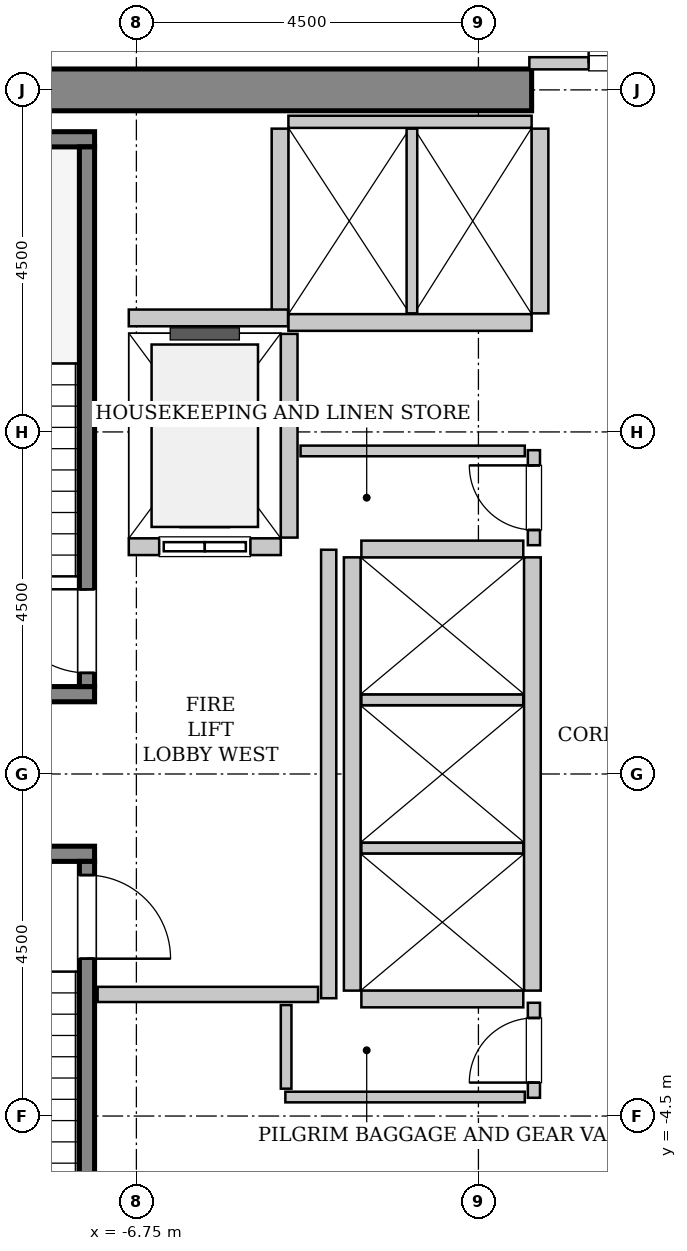
"""IFC4 building model, lengths in metres.
Left out: names, types, materials, properties, quantities, classifications, styles, units other than length and angle.
Written with IfcOpenShell. Run it as: python <this file> out.ifc"""

import sys

from ifc_helpers import new_model, si_unit, direction, frame, frame_2d, origin, place, context, subcontext, project, spatial, rectangle, extrude, source, transform, mapped, element, fill, save


model = new_model("IFC4")
c1 = context("Model", 3, precision=1e-05, world=origin(), true_north=direction((0.0, 1.0)))
c2 = subcontext(c1, "Body", "Model", "MODEL_VIEW")
j1 = project(units=[si_unit("LENGTHUNIT", "METRE"), si_unit("PLANEANGLEUNIT", "RADIAN")], contexts=[c1])
p1 = place(None, origin())
s1 = spatial("IfcSite", under=j1, at=p1, CompositionType="ELEMENT")
p2 = place(p1, origin())
s2 = spatial("IfcBuilding", under=s1, at=p2, CompositionType="ELEMENT")
p3 = place(p2, frame((0.0, 0.0, 148.8)))
s3 = spatial("IfcBuildingStorey", under=s2, at=p3, CompositionType="ELEMENT", Elevation=148.8)
m1 = source(origin(), c2, "Body", "SweptSolid", [
    extrude(rectangle(XDim=9.975, YDim=0.55, at=frame_2d((4.987, 0.0))), origin(), (0.0, 0.0, 1.0), 3.8),
])
p4 = place(p3, frame((-11.525, 9.0, 0.0), z_axis=(0.0, 0.0, 1.0), x_axis=(1.0, 0.0, 0.0)))
e1 = element("IfcWall", 1, at=p4, inside=s3, PredefinedType="SHEAR", context=c2, shape_type="MappedRepresentation", body=[
    mapped(m1, transform((0.0, 0.0, 0.0), x_axis=(1.0, 0.0, 0.0), y_axis=(0.0, 1.0, 0.0), z_axis=(0.0, 0.0, 1.0), scale=1.0)),
])
m2 = source(origin(), c2, "Body", "SweptSolid", [
    extrude(rectangle(XDim=3.4, YDim=0.2, at=frame_2d((1.7, 0.0))), origin(), (0.0, 0.0, 1.0), 3.8),
])
p5 = place(p3, frame((-7.3, 1.05, 0.0), z_axis=(0.0, 0.0, 1.0), x_axis=(-1.0, 0.0, 0.0)))
e2 = element("IfcWall", 2, at=p5, inside=s3, PredefinedType="SOLIDWALL", context=c2, shape_type="MappedRepresentation", body=[
    mapped(m2, transform((0.0, 0.0, 0.0), x_axis=(1.0, 0.0, 0.0), y_axis=(0.0, 1.0, 0.0), z_axis=(0.0, 0.0, 1.0), scale=1.0)),
])
m3 = source(origin(), c2, "Body", "SweptSolid", [
    extrude(rectangle(XDim=3.68, YDim=0.2, at=frame_2d((1.84, 0.0))), origin(), (0.0, 0.0, 1.0), 3.8),
])
p6 = place(p3, frame((-7.3, 8.35, 0.0), z_axis=(0.0, 0.0, 1.0), x_axis=(-1.0, 0.0, 0.0)))
e3 = element("IfcWall", 3, at=p6, inside=s3, PredefinedType="SOLIDWALL", context=c2, shape_type="MappedRepresentation", body=[
    mapped(m3, transform((0.0, 0.0, 0.0), x_axis=(1.0, 0.0, 0.0), y_axis=(0.0, 1.0, 0.0), z_axis=(0.0, 0.0, 1.0), scale=1.0)),
])
m4 = source(origin(), c2, "Body", "SweptSolid", [
    extrude(rectangle(XDim=7.1, YDim=0.2, at=frame_2d((3.55, 0.0))), origin(), (0.0, 0.0, 1.0), 3.8),
])
p7 = place(p3, frame((-7.4, 1.15, 0.0), z_axis=(0.0, 0.0, 1.0), x_axis=(0.0, 1.0, 0.0)))
e4 = element("IfcWall", 4, at=p7, inside=s3, PredefinedType="SOLIDWALL", context=c2, shape_type="MappedRepresentation", body=[
    mapped(m4, transform((0.0, 0.0, 0.0), x_axis=(1.0, 0.0, 0.0), y_axis=(0.0, 1.0, 0.0), z_axis=(0.0, 0.0, 1.0), scale=1.0)),
])
p8 = place(p7, frame((0.18, 0.0, 0.0)))
e5 = element("IfcOpeningElement", 5, at=p8, cuts=e4, PredefinedType="OPENING", context=c2, shape_type="SweptSolid", body=[
    extrude(rectangle(XDim=1.1, YDim=2.15, at=frame_2d((0.55, 1.075))), frame((0.0, 0.11, 0.0), z_axis=(0.0, -1.0, 0.0), x_axis=(1.0, 0.0, 0.0)), (0.0, 0.0, 1.0), 0.22),
])
p9 = place(p3, frame((-10.7, -1.05, 0.0), z_axis=(0.0, 0.0, 1.0), x_axis=(1.0, 0.0, 0.0)))
e6 = element("IfcWall", 6, at=p9, inside=s3, PredefinedType="SOLIDWALL", context=c2, shape_type="MappedRepresentation", body=[
    mapped(m2, transform((0.0, 0.0, 0.0), x_axis=(1.0, 0.0, 0.0), y_axis=(0.0, 1.0, 0.0), z_axis=(0.0, 0.0, 1.0), scale=1.0)),
])
p10 = place(p3, frame((-7.4, -1.15, 0.0), z_axis=(0.0, 0.0, 1.0), x_axis=(0.0, -1.0, 0.0)))
e7 = element("IfcWall", 7, at=p10, inside=s3, PredefinedType="SOLIDWALL", context=c2, shape_type="MappedRepresentation", body=[
    mapped(m4, transform((0.0, 0.0, 0.0), x_axis=(1.0, 0.0, 0.0), y_axis=(0.0, 1.0, 0.0), z_axis=(0.0, 0.0, 1.0), scale=1.0)),
])
p11 = place(p10, frame((0.18, 0.0, 0.0)))
e8 = element("IfcOpeningElement", 8, at=p11, cuts=e7, PredefinedType="OPENING", context=c2, shape_type="SweptSolid", body=[
    extrude(rectangle(XDim=1.1, YDim=2.15, at=frame_2d((0.55, 1.075))), frame((0.0, 0.11, 0.0), z_axis=(0.0, -1.0, 0.0), x_axis=(1.0, 0.0, 0.0)), (0.0, 0.0, 1.0), 0.22),
])
m5 = source(origin(), c2, "Body", "SweptSolid", [
    extrude(rectangle(XDim=2.0, YDim=0.22, at=frame_2d((1.0, 0.0))), origin(), (0.0, 0.0, 1.0), 3.535),
])
p12 = place(p3, frame((-6.85, 2.99, 0.0), z_axis=(0.0, 0.0, 1.0), x_axis=(1.0, 0.0, 0.0)))
e9 = element("IfcWall", 9, at=p12, inside=s3, PredefinedType="SOLIDWALL", context=c2, shape_type="MappedRepresentation", body=[
    mapped(m5, transform((0.0, 0.0, 0.0), x_axis=(1.0, 0.0, 0.0), y_axis=(0.0, 1.0, 0.0), z_axis=(0.0, 0.0, 1.0), scale=1.0)),
])
p13 = place(p12, frame((0.4, 0.0, 0.0)))
e10 = element("IfcOpeningElement", 10, at=p13, cuts=e9, PredefinedType="OPENING", context=c2, shape_type="SweptSolid", body=[
    extrude(rectangle(XDim=1.2, YDim=2.2, at=frame_2d((0.6, 1.1))), frame((0.0, 0.12, 0.0), z_axis=(0.0, -1.0, 0.0), x_axis=(1.0, 0.0, 0.0)), (0.0, 0.0, 1.0), 0.24),
])
m6 = source(origin(), c2, "Body", "SweptSolid", [
    extrude(rectangle(XDim=2.68, YDim=0.22, at=frame_2d((1.34, 0.0))), origin(), (0.0, 0.0, 1.0), 3.535),
])
p14 = place(p3, frame((-4.74, 3.11, 0.0), z_axis=(0.0, 0.0, 1.0), x_axis=(0.0, 1.0, 0.0)))
e11 = element("IfcWall", 11, at=p14, inside=s3, PredefinedType="SOLIDWALL", context=c2, shape_type="MappedRepresentation", body=[
    mapped(m6, transform((0.0, 0.0, 0.0), x_axis=(1.0, 0.0, 0.0), y_axis=(0.0, 1.0, 0.0), z_axis=(0.0, 0.0, 1.0), scale=1.0)),
])
m7 = source(origin(), c2, "Body", "SweptSolid", [
    extrude(rectangle(XDim=3.2, YDim=0.22, at=frame_2d((1.6, 0.0))), origin(), (0.0, 0.0, 1.0), 3.535),
])
p15 = place(p3, frame((-4.75, 5.94, 0.0), z_axis=(0.0, 0.0, 1.0), x_axis=(1.0, 0.0, 0.0)))
e12 = element("IfcWall", 12, at=p15, inside=s3, PredefinedType="SOLIDWALL", context=c2, shape_type="MappedRepresentation", body=[
    mapped(m7, transform((0.0, 0.0, 0.0), x_axis=(1.0, 0.0, 0.0), y_axis=(0.0, 1.0, 0.0), z_axis=(0.0, 0.0, 1.0), scale=1.0)),
])
m8 = source(origin(), c2, "Body", "SweptSolid", [
    extrude(rectangle(XDim=3.2, YDim=0.16, at=frame_2d((1.6, 0.0))), origin(), (0.0, 0.0, 1.0), 2.425),
])
p16 = place(p3, frame((-1.55, 8.58, 0.0), z_axis=(0.0, 0.0, 1.0), x_axis=(-1.0, 0.0, 0.0)))
e13 = element("IfcWall", 13, at=p16, inside=s3, PredefinedType="PARTITIONING", context=c2, shape_type="MappedRepresentation", body=[
    mapped(m8, transform((0.0, 0.0, 0.0), x_axis=(1.0, 0.0, 0.0), y_axis=(0.0, 1.0, 0.0), z_axis=(0.0, 0.0, 1.0), scale=1.0)),
])
m9 = source(origin(), c2, "Body", "SweptSolid", [
    extrude(rectangle(XDim=2.43, YDim=0.22, at=frame_2d((1.215, 0.0))), origin(), (0.0, 0.0, 1.0), 3.535),
])
p17 = place(p3, frame((-4.86, 8.49, 0.0), z_axis=(0.0, 0.0, 1.0), x_axis=(0.0, -1.0, 0.0)))
e14 = element("IfcWall", 14, at=p17, inside=s3, PredefinedType="SOLIDWALL", context=c2, shape_type="MappedRepresentation", body=[
    mapped(m9, transform((0.0, 0.0, 0.0), x_axis=(1.0, 0.0, 0.0), y_axis=(0.0, 1.0, 0.0), z_axis=(0.0, 0.0, 1.0), scale=1.0)),
])
m10 = source(origin(), c2, "Body", "SweptSolid", [
    extrude(rectangle(XDim=2.43, YDim=0.14, at=frame_2d((1.215, 0.0))), origin(), (0.0, 0.0, 1.0), 3.535),
])
p18 = place(p3, frame((-3.125, 6.06, 0.0), z_axis=(0.0, 0.0, 1.0), x_axis=(0.0, 1.0, 0.0)))
e15 = element("IfcWall", 15, at=p18, inside=s3, PredefinedType="PARTITIONING", context=c2, shape_type="MappedRepresentation", body=[
    mapped(m10, transform((0.0, 0.0, 0.0), x_axis=(1.0, 0.0, 0.0), y_axis=(0.0, 1.0, 0.0), z_axis=(0.0, 0.0, 1.0), scale=1.0)),
])
p19 = place(p3, frame((-1.44, 6.06, 0.0), z_axis=(0.0, 0.0, 1.0), x_axis=(0.0, 1.0, 0.0)))
e16 = element("IfcWall", 16, at=p19, inside=s3, PredefinedType="SOLIDWALL", context=c2, shape_type="MappedRepresentation", body=[
    mapped(m9, transform((0.0, 0.0, 0.0), x_axis=(1.0, 0.0, 0.0), y_axis=(0.0, 1.0, 0.0), z_axis=(0.0, 0.0, 1.0), scale=1.0)),
])
m11 = source(origin(), c2, "Body", "SweptSolid", [
    extrude(rectangle(XDim=5.7, YDim=0.22, at=frame_2d((2.85, 0.0))), origin(), (0.0, 0.0, 1.0), 3.535),
])
for number, where, z_axis, x_axis in (
    (17, (-1.54, -2.85, 0.0), (0.0, 0.0, 1.0), (0.0, 1.0, 0.0)),
    (18, (-3.91, 2.85, 0.0), (0.0, 0.0, 1.0), (0.0, -1.0, 0.0)),
):
    element("IfcWall", number, at=place(p3, frame(where, z_axis=z_axis, x_axis=x_axis)), inside=s3, PredefinedType="SOLIDWALL", context=c2, shape_type="MappedRepresentation", body=[
        mapped(m11, transform((0.0, 0.0, 0.0), x_axis=(1.0, 0.0, 0.0), y_axis=(0.0, 1.0, 0.0), z_axis=(0.0, 0.0, 1.0), scale=1.0)),
    ])
m12 = source(origin(), c2, "Body", "SweptSolid", [
    extrude(rectangle(XDim=2.13, YDim=0.22, at=frame_2d((1.065, 0.0))), origin(), (0.0, 0.0, 1.0), 3.535),
])
p20 = place(p3, frame((-3.79, -2.96, 0.0), z_axis=(0.0, 0.0, 1.0), x_axis=(1.0, 0.0, 0.0)))
e19 = element("IfcWall", 19, at=p20, inside=s3, PredefinedType="SOLIDWALL", context=c2, shape_type="MappedRepresentation", body=[
    mapped(m12, transform((0.0, 0.0, 0.0), x_axis=(1.0, 0.0, 0.0), y_axis=(0.0, 1.0, 0.0), z_axis=(0.0, 0.0, 1.0), scale=1.0)),
])
m13 = source(origin(), c2, "Body", "SweptSolid", [
    extrude(rectangle(XDim=2.13, YDim=0.14, at=frame_2d((1.065, 0.0))), origin(), (0.0, 0.0, 1.0), 3.535),
])
for number, where, z_axis, x_axis in (
    (20, (-3.79, -0.975, 0.0), (0.0, 0.0, 1.0), (1.0, 0.0, 0.0)),
    (21, (-3.79, 0.975, 0.0), (0.0, 0.0, 1.0), (1.0, 0.0, 0.0)),
):
    element("IfcWall", number, at=place(p3, frame(where, z_axis=z_axis, x_axis=x_axis)), inside=s3, PredefinedType="PARTITIONING", context=c2, shape_type="MappedRepresentation", body=[
        mapped(m13, transform((0.0, 0.0, 0.0), x_axis=(1.0, 0.0, 0.0), y_axis=(0.0, 1.0, 0.0), z_axis=(0.0, 0.0, 1.0), scale=1.0)),
    ])
p21 = place(p3, frame((-1.66, 2.96, 0.0), z_axis=(0.0, 0.0, 1.0), x_axis=(-1.0, 0.0, 0.0)))
e22 = element("IfcWall", 22, at=p21, inside=s3, PredefinedType="SOLIDWALL", context=c2, shape_type="MappedRepresentation", body=[
    mapped(m12, transform((0.0, 0.0, 0.0), x_axis=(1.0, 0.0, 0.0), y_axis=(0.0, 1.0, 0.0), z_axis=(0.0, 0.0, 1.0), scale=1.0)),
])
m14 = source(origin(), c2, "Body", "SweptSolid", [
    extrude(rectangle(XDim=2.095, YDim=0.22, at=frame_2d((1.048, 0.0))), origin(), (0.0, 0.0, 1.0), 3.535),
])
p22 = place(p3, frame((-6.85, 6.0, 0.0), z_axis=(0.0, 0.0, 1.0), x_axis=(1.0, 0.0, 0.0)))
e23 = element("IfcWall", 23, at=p22, inside=s3, PredefinedType="SOLIDWALL", context=c2, shape_type="MappedRepresentation", body=[
    mapped(m14, transform((0.0, 0.0, 0.0), x_axis=(1.0, 0.0, 0.0), y_axis=(0.0, 1.0, 0.0), z_axis=(0.0, 0.0, 1.0), scale=1.0)),
])
m15 = source(origin(), c2, "Body", "SweptSolid", [
    extrude(rectangle(XDim=5.9, YDim=0.2, at=frame_2d((2.95, 0.0))), origin(), (0.0, 0.0, 1.0), 3.535),
])
p23 = place(p3, frame((-4.22, -2.95, 0.0), z_axis=(0.0, 0.0, 1.0), x_axis=(0.0, 1.0, 0.0)))
e24 = element("IfcWall", 24, at=p23, inside=s3, PredefinedType="PARTITIONING", context=c2, shape_type="MappedRepresentation", body=[
    mapped(m15, transform((0.0, 0.0, 0.0), x_axis=(1.0, 0.0, 0.0), y_axis=(0.0, 1.0, 0.0), z_axis=(0.0, 0.0, 1.0), scale=1.0)),
])
m16 = source(origin(), c2, "Body", "SweptSolid", [
    extrude(rectangle(XDim=2.9, YDim=0.2, at=frame_2d((1.45, 0.0))), origin(), (0.0, 0.0, 1.0), 3.535),
])
p24 = place(p3, frame((-7.26, -2.9, 0.0), z_axis=(0.0, 0.0, 1.0), x_axis=(1.0, 0.0, 0.0)))
e25 = element("IfcWall", 25, at=p24, inside=s3, PredefinedType="PARTITIONING", context=c2, shape_type="MappedRepresentation", body=[
    mapped(m16, transform((0.0, 0.0, 0.0), x_axis=(1.0, 0.0, 0.0), y_axis=(0.0, 1.0, 0.0), z_axis=(0.0, 0.0, 1.0), scale=1.0)),
])
m17 = source(origin(), c2, "Body", "SweptSolid", [
    extrude(rectangle(XDim=3.16, YDim=0.16, at=frame_2d((1.58, 0.0))), origin(), (0.0, 0.0, 1.0), 2.425),
])
p25 = place(p3, frame((-1.58, 9.35, 0.0), z_axis=(0.0, 0.0, 1.0), x_axis=(1.0, 0.0, 0.0)))
e26 = element("IfcWall", 26, at=p25, inside=s3, PredefinedType="PARTITIONING", context=c2, shape_type="MappedRepresentation", body=[
    mapped(m17, transform((0.0, 0.0, 0.0), x_axis=(1.0, 0.0, 0.0), y_axis=(0.0, 1.0, 0.0), z_axis=(0.0, 0.0, 1.0), scale=1.0)),
])
p26 = place(p25, frame((0.78, 0.0, 0.0)))
e27 = element("IfcOpeningElement", 27, at=p26, cuts=e26, PredefinedType="OPENING", context=c2, shape_type="SweptSolid", body=[
    extrude(rectangle(XDim=1.6, YDim=2.3, at=frame_2d((0.8, 1.15))), frame((0.0, 0.09, 0.0), z_axis=(0.0, -1.0, 0.0), x_axis=(1.0, 0.0, 0.0)), (0.0, 0.0, 1.0), 0.18),
])
m18 = source(origin(), c2, "Body", "SweptSolid", [
    extrude(rectangle(XDim=1.25, YDim=0.16, at=frame_2d((0.625, 0.0))), origin(), (0.0, 0.0, 1.0), 3.535),
])
p27 = place(p3, frame((-1.52, 3.01, 0.0), z_axis=(0.0, 0.0, 1.0), x_axis=(0.0, 1.0, 0.0)))
e28 = element("IfcWall", 28, at=p27, inside=s3, PredefinedType="PARTITIONING", context=c2, shape_type="MappedRepresentation", body=[
    mapped(m18, transform((0.0, 0.0, 0.0), x_axis=(1.0, 0.0, 0.0), y_axis=(0.0, 1.0, 0.0), z_axis=(0.0, 0.0, 1.0), scale=1.0)),
])
p28 = place(p27, frame((0.2, 0.0, 0.0)))
e29 = element("IfcOpeningElement", 29, at=p28, cuts=e28, PredefinedType="OPENING", context=c2, shape_type="SweptSolid", body=[
    extrude(rectangle(XDim=0.85, YDim=2.1, at=frame_2d((0.425, 1.05))), frame((0.0, 0.09, 0.0), z_axis=(0.0, -1.0, 0.0), x_axis=(1.0, 0.0, 0.0)), (0.0, 0.0, 1.0), 0.18),
])
m19 = source(origin(), c2, "Body", "SweptSolid", [
    extrude(rectangle(XDim=2.95, YDim=0.14, at=frame_2d((1.475, 0.0))), origin(), (0.0, 0.0, 1.0), 3.535),
])
p29 = place(p3, frame((-4.59, 4.25, 0.0), z_axis=(0.0, 0.0, 1.0), x_axis=(1.0, 0.0, 0.0)))
e30 = element("IfcWall", 30, at=p29, inside=s3, PredefinedType="PARTITIONING", context=c2, shape_type="MappedRepresentation", body=[
    mapped(m19, transform((0.0, 0.0, 0.0), x_axis=(1.0, 0.0, 0.0), y_axis=(0.0, 1.0, 0.0), z_axis=(0.0, 0.0, 1.0), scale=1.0)),
])
p30 = place(p3, frame((-1.52, -4.26, 0.0), z_axis=(0.0, 0.0, 1.0), x_axis=(0.0, 1.0, 0.0)))
e31 = element("IfcWall", 31, at=p30, inside=s3, PredefinedType="PARTITIONING", context=c2, shape_type="MappedRepresentation", body=[
    mapped(m18, transform((0.0, 0.0, 0.0), x_axis=(1.0, 0.0, 0.0), y_axis=(0.0, 1.0, 0.0), z_axis=(0.0, 0.0, 1.0), scale=1.0)),
])
p31 = place(p30, frame((0.2, 0.0, 0.0)))
e32 = element("IfcOpeningElement", 32, at=p31, cuts=e31, PredefinedType="OPENING", context=c2, shape_type="SweptSolid", body=[
    extrude(rectangle(XDim=0.85, YDim=2.1, at=frame_2d((0.425, 1.05))), frame((0.0, 0.09, 0.0), z_axis=(0.0, -1.0, 0.0), x_axis=(1.0, 0.0, 0.0)), (0.0, 0.0, 1.0), 0.18),
])
m20 = source(origin(), c2, "Body", "SweptSolid", [
    extrude(rectangle(XDim=3.15, YDim=0.14, at=frame_2d((1.575, 0.0))), origin(), (0.0, 0.0, 1.0), 3.535),
])
p32 = place(p3, frame((-4.79, -4.25, 0.0), z_axis=(0.0, 0.0, 1.0), x_axis=(1.0, 0.0, 0.0)))
e33 = element("IfcWall", 33, at=p32, inside=s3, PredefinedType="PARTITIONING", context=c2, shape_type="MappedRepresentation", body=[
    mapped(m20, transform((0.0, 0.0, 0.0), x_axis=(1.0, 0.0, 0.0), y_axis=(0.0, 1.0, 0.0), z_axis=(0.0, 0.0, 1.0), scale=1.0)),
])
m21 = source(origin(), c2, "Body", "SweptSolid", [
    extrude(rectangle(XDim=1.1, YDim=0.14, at=frame_2d((0.55, 0.0))), origin(), (0.0, 0.0, 1.0), 3.535),
])
p33 = place(p3, frame((-4.78, -4.14, 0.0), z_axis=(0.0, 0.0, 1.0), x_axis=(0.0, 1.0, 0.0)))
e34 = element("IfcWall", 34, at=p33, inside=s3, PredefinedType="PARTITIONING", context=c2, shape_type="MappedRepresentation", body=[
    mapped(m21, transform((0.0, 0.0, 0.0), x_axis=(1.0, 0.0, 0.0), y_axis=(0.0, 1.0, 0.0), z_axis=(0.0, 0.0, 1.0), scale=1.0)),
])
m22 = source(origin(), c2, "Body", "SweptSolid", [
    extrude(rectangle(XDim=1.1, YDim=2.15, at=frame_2d((0.55, 1.075))), frame((0.0, 0.025, 0.0), z_axis=(0.0, -1.0, 0.0), x_axis=(1.0, 0.0, 0.0)), (0.0, 0.0, 1.0), 0.05),
])
p34 = place(p8, origin())
e35 = element("IfcDoor", 35, at=p34, inside=s3, OperationType="SINGLE_SWING_RIGHT", PredefinedType="DOOR", context=c2, shape_type="MappedRepresentation", body=[
    mapped(m22, transform((0.0, 0.0, 0.0), x_axis=(1.0, 0.0, 0.0), y_axis=(0.0, 1.0, 0.0), z_axis=(0.0, 0.0, 1.0), scale=1.0)),
])
fill(e5, e35)
p35 = place(p11, origin())
e36 = element("IfcDoor", 36, at=p35, inside=s3, OperationType="SINGLE_SWING_RIGHT", PredefinedType="DOOR", context=c2, shape_type="MappedRepresentation", body=[
    mapped(m22, transform((0.0, 0.0, 0.0), x_axis=(1.0, 0.0, 0.0), y_axis=(0.0, 1.0, 0.0), z_axis=(0.0, 0.0, 1.0), scale=1.0)),
])
fill(e8, e36)
m23 = source(origin(), c2, "Body", "SweptSolid", [
    extrude(rectangle(XDim=1.2, YDim=2.2, at=frame_2d((0.6, 1.1))), frame((0.0, 0.025, 0.0), z_axis=(0.0, -1.0, 0.0), x_axis=(1.0, 0.0, 0.0)), (0.0, 0.0, 1.0), 0.05),
])
p36 = place(p13, origin())
e37 = element("IfcDoor", 37, at=p36, inside=s3, OperationType="SLIDING_TO_LEFT", PredefinedType="DOOR", context=c2, shape_type="MappedRepresentation", body=[
    mapped(m23, transform((0.0, 0.0, 0.0), x_axis=(1.0, 0.0, 0.0), y_axis=(0.0, 1.0, 0.0), z_axis=(0.0, 0.0, 1.0), scale=1.0)),
])
fill(e10, e37)
m24 = source(origin(), c2, "Body", "SweptSolid", [
    extrude(rectangle(XDim=1.6, YDim=2.3, at=frame_2d((0.8, 1.15))), frame((0.0, 0.025, 0.0), z_axis=(0.0, -1.0, 0.0), x_axis=(1.0, 0.0, 0.0)), (0.0, 0.0, 1.0), 0.05),
])
p37 = place(p26, origin())
e38 = element("IfcDoor", 38, at=p37, inside=s3, OperationType="DOUBLE_DOOR_SINGLE_SWING", PredefinedType="DOOR", context=c2, shape_type="MappedRepresentation", body=[
    mapped(m24, transform((0.0, 0.0, 0.0), x_axis=(1.0, 0.0, 0.0), y_axis=(0.0, 1.0, 0.0), z_axis=(0.0, 0.0, 1.0), scale=1.0)),
])
fill(e27, e38)
m25 = source(origin(), c2, "Body", "SweptSolid", [
    extrude(rectangle(XDim=0.85, YDim=2.1, at=frame_2d((0.425, 1.05))), frame((0.0, 0.025, 0.0), z_axis=(0.0, -1.0, 0.0), x_axis=(1.0, 0.0, 0.0)), (0.0, 0.0, 1.0), 0.05),
])
p38 = place(p28, origin())
e39 = element("IfcDoor", 39, at=p38, inside=s3, OperationType="SINGLE_SWING_RIGHT", PredefinedType="DOOR", context=c2, shape_type="MappedRepresentation", body=[
    mapped(m25, transform((0.0, 0.0, 0.0), x_axis=(1.0, 0.0, 0.0), y_axis=(0.0, 1.0, 0.0), z_axis=(0.0, 0.0, 1.0), scale=1.0)),
])
fill(e29, e39)
p39 = place(p31, origin())
e40 = element("IfcDoor", 40, at=p39, inside=s3, OperationType="SINGLE_SWING_LEFT", PredefinedType="DOOR", context=c2, shape_type="MappedRepresentation", body=[
    mapped(m25, transform((0.0, 0.0, 0.0), x_axis=(1.0, 0.0, 0.0), y_axis=(0.0, 1.0, 0.0), z_axis=(0.0, 0.0, 1.0), scale=1.0)),
])
fill(e32, e40)
save(model, sys.argv[1])
